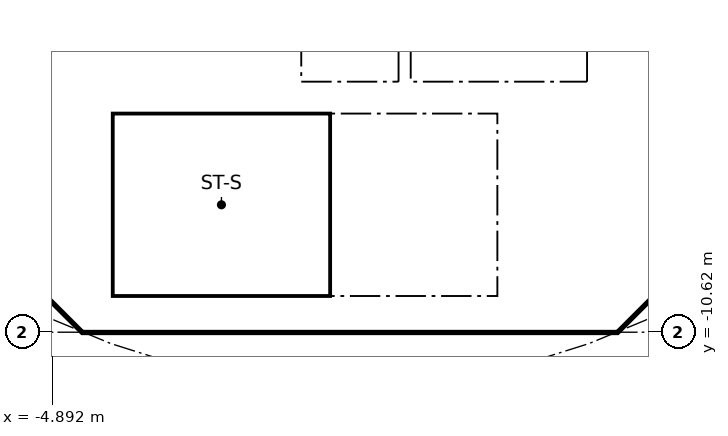
"""IFC4 building model, lengths in metres.
Left out: names, types, materials, properties, quantities, classifications, styles, units other than length and angle.
Written with IfcOpenShell. Run it as: python <this file> out.ifc"""

import sys

from ifc_helpers import new_model, si_unit, direction, frame, frame_2d, origin, place, context, subcontext, project, spatial, polyline, rectangle, outline, extrude, element, fill, save


model = new_model("IFC4")
c1 = context("Model", 3, precision=1e-05, world=origin(), true_north=direction((0.0, 1.0)))
c2 = subcontext(c1, "Body", "Model", "MODEL_VIEW")
j1 = project(units=[si_unit("LENGTHUNIT", "METRE"), si_unit("PLANEANGLEUNIT", "RADIAN")], contexts=[c1])
p1 = place(None, origin())
s1 = spatial("IfcSite", under=j1, at=p1, CompositionType="ELEMENT")
p2 = place(p1, origin())
s2 = spatial("IfcBuilding", under=s1, at=p2, CompositionType="ELEMENT")
p3 = place(p2, frame((0.0, 0.0, 130.7)))
s3 = spatial("IfcBuildingStorey", under=s2, at=p3, CompositionType="ELEMENT", Elevation=130.7)
p4 = place(p3, frame((-9.988, -4.613, 0.0), z_axis=(0.0, 0.0, 1.0), x_axis=(0.707106781187, -0.707106781187, 0.0)))
e1 = element("IfcWall", 1, at=p4, inside=s3, PredefinedType="SHEAR", context=c2, shape_type="SweptSolid", body=[
    extrude(rectangle(XDim=7.602, YDim=0.6, at=frame_2d((3.801, 0.0))), origin(), (0.0, 0.0, 1.0), 3.44),
])
p5 = place(p4, frame((6.151, 0.0, 0.0)))
e2 = element("IfcOpeningElement", 2, at=p5, cuts=e1, PredefinedType="OPENING", context=c2, shape_type="SweptSolid", body=[
    extrude(rectangle(XDim=1.1, YDim=2.1, at=frame_2d((0.55, 1.05))), frame((0.0, 0.31, 0.0), z_axis=(0.0, -1.0, 0.0), x_axis=(1.0, 0.0, 0.0)), (0.0, 0.0, 1.0), 0.62),
])
p6 = place(p3, frame((4.613, -9.988, 0.0), z_axis=(0.0, 0.0, 1.0), x_axis=(0.707106781187, 0.707106781187, 0.0)))
e3 = element("IfcWall", 3, at=p6, inside=s3, PredefinedType="SHEAR", context=c2, shape_type="SweptSolid", body=[
    extrude(rectangle(XDim=7.602, YDim=0.6, at=frame_2d((3.801, 0.0))), origin(), (0.0, 0.0, 1.0), 3.44),
])
p7 = place(p6, frame((3.201, 0.0, 0.0)))
e4 = element("IfcOpeningElement", 4, at=p7, cuts=e3, PredefinedType="OPENING", context=c2, shape_type="SweptSolid", body=[
    extrude(rectangle(XDim=1.2, YDim=2.1, at=frame_2d((0.6, 1.05))), frame((0.0, 0.31, 0.0), z_axis=(0.0, -1.0, 0.0), x_axis=(1.0, 0.0, 0.0)), (0.0, 0.0, 1.0), 0.62),
])
p8 = place(p3, frame((4.0, -10.025, 0.0), z_axis=(0.0, 0.0, 1.0), x_axis=(0.0, 1.0, 0.0)))
e5 = element("IfcWall", 5, at=p8, inside=s3, PredefinedType="SOLIDWALL", context=c2, shape_type="SweptSolid", body=[
    extrude(rectangle(XDim=3.0, YDim=0.2, at=frame_2d((1.5, 0.0))), origin(), (0.0, 0.0, 1.0), 3.44),
])
p9 = place(p8, frame((0.975, 0.0, 0.0)))
e6 = element("IfcOpeningElement", 6, at=p9, cuts=e5, PredefinedType="OPENING", context=c2, shape_type="SweptSolid", body=[
    extrude(rectangle(XDim=1.1, YDim=2.1, at=frame_2d((0.55, 1.05))), frame((0.0, 0.11, 0.0), z_axis=(0.0, -1.0, 0.0), x_axis=(1.0, 0.0, 0.0)), (0.0, 0.0, 1.0), 0.22),
])
p10 = place(p3, frame((4.0, -6.5, 0.0), z_axis=(0.0, 0.0, 1.0), x_axis=(0.0, 1.0, 0.0)))
e7 = element("IfcWall", 7, at=p10, inside=s3, PredefinedType="SOLIDWALL", context=c2, shape_type="SweptSolid", body=[
    extrude(rectangle(XDim=2.2, YDim=0.2, at=frame_2d((1.1, 0.0))), origin(), (0.0, 0.0, 1.0), 3.44),
])
p11 = place(p10, frame((0.55, 0.0, 0.0)))
e8 = element("IfcOpeningElement", 8, at=p11, cuts=e7, PredefinedType="OPENING", context=c2, shape_type="SweptSolid", body=[
    extrude(rectangle(XDim=1.1, YDim=2.1, at=frame_2d((0.55, 1.05))), frame((0.0, 0.11, 0.0), z_axis=(0.0, -1.0, 0.0), x_axis=(1.0, 0.0, 0.0)), (0.0, 0.0, 1.0), 0.22),
])
p12 = place(p3, frame((-4.0, -6.5, 0.0), z_axis=(0.0, 0.0, 1.0), x_axis=(0.0, 1.0, 0.0)))
e9 = element("IfcWall", 9, at=p12, inside=s3, PredefinedType="SOLIDWALL", context=c2, shape_type="SweptSolid", body=[
    extrude(rectangle(XDim=2.2, YDim=0.2, at=frame_2d((1.1, 0.0))), origin(), (0.0, 0.0, 1.0), 3.44),
])
p13 = place(p12, frame((0.65, 0.0, 0.0)))
e10 = element("IfcOpeningElement", 10, at=p13, cuts=e9, PredefinedType="OPENING", context=c2, shape_type="SweptSolid", body=[
    extrude(rectangle(XDim=0.9, YDim=2.1, at=frame_2d((0.45, 1.05))), frame((0.0, 0.11, 0.0), z_axis=(0.0, -1.0, 0.0), x_axis=(1.0, 0.0, 0.0)), (0.0, 0.0, 1.0), 0.22),
])
p14 = place(p3, origin())
e11 = element("IfcWall", 11, at=p14, inside=s3, PredefinedType="SHEAR", context=c2, shape_type="SweptSolid", body=[
    extrude(outline(polyline([(-4.152, -10.025), (4.152, -10.025), (4.401, -9.776), (4.825, -10.2), (4.401, -10.625), (-4.401, -10.625), (-4.825, -10.2), (-4.401, -9.776), (-4.152, -10.025)])), origin(), (0.0, 0.0, 1.0), 3.44),
])
for number, where, z_axis, x_axis in (
    (12, (-0.9, -6.5, 0.0), (0.0, 0.0, 1.0), (0.0, 1.0, 0.0)),
    (13, (0.9, -6.5, 0.0), (0.0, 0.0, 1.0), (0.0, 1.0, 0.0)),
):
    element("IfcWall", number, at=place(p3, frame(where, z_axis=z_axis, x_axis=x_axis)), inside=s3, PredefinedType="SOLIDWALL", context=c2, shape_type="SweptSolid", body=[
        extrude(rectangle(XDim=2.2, YDim=0.2, at=frame_2d((1.1, 0.0))), origin(), (0.0, 0.0, 1.0), 3.44),
    ])
p15 = place(p3, origin())
e14 = element("IfcWall", 14, at=p15, inside=s3, PredefinedType="SOLIDWALL", context=c2, shape_type="SweptSolid", body=[
    extrude(outline(polyline([(-3.9, -10.025), (-4.1, -10.025), (-4.1, -7.025), (-3.9, -7.025), (-3.9, -10.025)])), origin(), (0.0, 0.0, 1.0), 3.44),
])
p16 = place(p3, origin())
e15 = element("IfcWall", 15, at=p16, inside=s3, PredefinedType="SOLIDWALL", context=c2, shape_type="SweptSolid", body=[
    extrude(outline(polyline([(4.1, -7.025), (-4.1, -7.025), (-4.1, -6.5), (4.1, -6.5), (4.1, -7.025)])), origin(), (0.0, 0.0, 1.0), 3.44),
])
p17 = place(p9, origin())
e16 = element("IfcDoor", 16, at=p17, inside=s3, OperationType="SINGLE_SWING_RIGHT", PredefinedType="DOOR", context=c2, shape_type="SweptSolid", body=[
    extrude(rectangle(XDim=1.1, YDim=2.1, at=frame_2d((0.55, 1.05))), frame((0.0, 0.025, 0.0), z_axis=(0.0, -1.0, 0.0), x_axis=(1.0, 0.0, 0.0)), (0.0, 0.0, 1.0), 0.05),
])
fill(e6, e16)
p18 = place(p5, origin())
e17 = element("IfcDoor", 17, at=p18, inside=s3, OperationType="SINGLE_SWING_LEFT", PredefinedType="DOOR", context=c2, shape_type="SweptSolid", body=[
    extrude(rectangle(XDim=1.1, YDim=2.1, at=frame_2d((0.55, 1.05))), frame((0.0, 0.025, 0.0), z_axis=(0.0, -1.0, 0.0), x_axis=(1.0, 0.0, 0.0)), (0.0, 0.0, 1.0), 0.05),
])
fill(e2, e17)
save(model, sys.argv[1])
